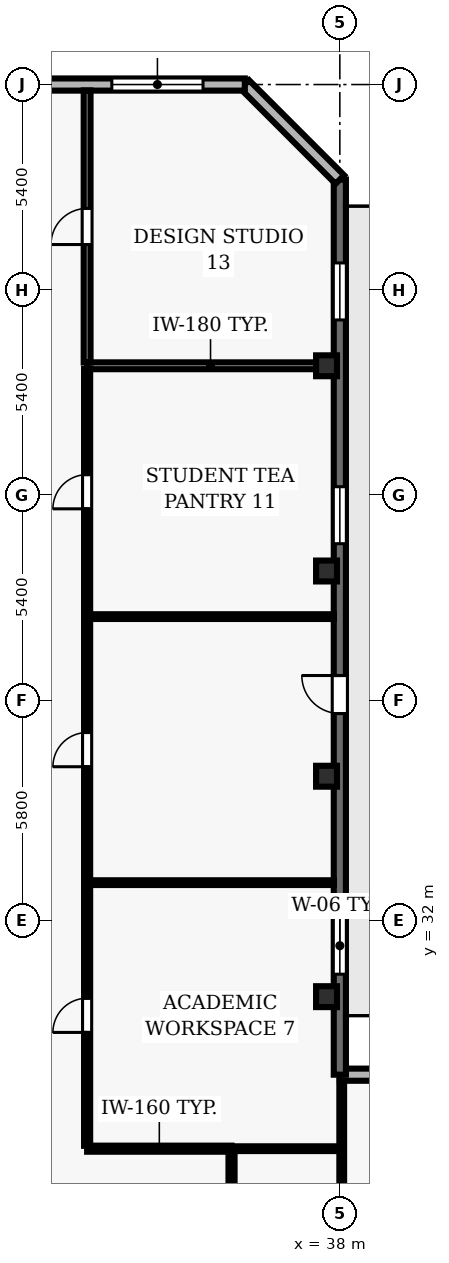
"""IFC4 building model, lengths in metres.
Left out: names, types, materials, properties, quantities, classifications, styles, units other than length and angle.
Written with IfcOpenShell. Run it as: python <this file> out.ifc"""

import sys

from ifc_helpers import new_model, si_unit, direction, frame, frame_2d, origin, origin_2d, place, context, subcontext, project, spatial, rectangle, hollow_rectangle, extrude, element, fill, save


model = new_model("IFC4")
c1 = context("Model", 3, precision=1e-05, world=origin(), true_north=direction((0.0, 1.0)))
c2 = subcontext(c1, "Body", "Model", "MODEL_VIEW")
j1 = project(units=[si_unit("LENGTHUNIT", "METRE"), si_unit("PLANEANGLEUNIT", "RADIAN")], contexts=[c1])
p1 = place(None, origin())
s1 = spatial("IfcSite", under=j1, at=p1, CompositionType="ELEMENT")
p2 = place(p1, origin())
s2 = spatial("IfcBuilding", under=s1, at=p2, CompositionType="ELEMENT")
p3 = place(p2, frame((0.0, 0.0, 42.7)))
s3 = spatial("IfcBuildingStorey", under=s2, at=p3, CompositionType="ELEMENT", Elevation=42.7)
for number, where, z_axis, x_axis in (
    (1, (37.65, 30.0, 0.0), (0.0, 0.0, 1.0), (1.0, 0.0, 0.0)),
    (2, (37.65, 35.8, 0.0), (0.0, 0.0, 1.0), (1.0, 0.0, 0.0)),
    (3, (37.65, 41.2, 0.0), (0.0, 0.0, 1.0), (1.0, 0.0, 0.0)),
    (4, (37.65, 46.6, 0.0), (0.0, 0.0, 1.0), (1.0, 0.0, 0.0)),
):
    element("IfcColumn", number, at=place(p3, frame(where, z_axis=z_axis, x_axis=x_axis)), inside=s3, PredefinedType="COLUMN", context=c2, shape_type="SweptSolid", body=[
        extrude(hollow_rectangle(XDim=0.55, YDim=0.55, WallThickness=0.025, at=origin_2d()), origin(), (0.0, 0.0, 1.0), 3.9),
    ])
p4 = place(p3, frame((52.85, 27.947, 0.0), z_axis=(0.0, 0.0, 1.0), x_axis=(-1.0, 0.0, 0.0)))
e5 = element("IfcWall", 5, at=p4, inside=s3, PredefinedType="SOLIDWALL", context=c2, shape_type="SweptSolid", body=[
    extrude(rectangle(XDim=14.85, YDim=0.32, at=frame_2d((7.425, 0.0))), origin(), (0.0, 0.0, 1.0), 3.69),
])
p5 = place(p4, frame((2.513, 0.0, 0.9)))
e6 = element("IfcOpeningElement", 6, at=p5, cuts=e5, PredefinedType="OPENING", context=c2, shape_type="SweptSolid", body=[
    extrude(rectangle(XDim=2.4, YDim=1.6, at=frame_2d((1.2, 0.8))), frame((0.0, 0.17, 0.0), z_axis=(0.0, -1.0, 0.0), x_axis=(1.0, 0.0, 0.0)), (0.0, 0.0, 1.0), 0.34),
])
p6 = place(p4, frame((9.938, 0.0, 0.9)))
e7 = element("IfcOpeningElement", 7, at=p6, cuts=e5, PredefinedType="OPENING", context=c2, shape_type="SweptSolid", body=[
    extrude(rectangle(XDim=2.4, YDim=1.6, at=frame_2d((1.2, 0.8))), frame((0.0, 0.17, 0.0), z_axis=(0.0, -1.0, 0.0), x_axis=(1.0, 0.0, 0.0)), (0.0, 0.0, 1.0), 0.34),
])
p7 = place(p3, frame((38.0, 27.947, 0.0), z_axis=(0.0, 0.0, 1.0), x_axis=(0.0, 1.0, 0.0)))
e8 = element("IfcWall", 8, at=p7, inside=s3, PredefinedType="SOLIDWALL", context=c2, shape_type="SweptSolid", body=[
    extrude(rectangle(XDim=23.553, YDim=0.32, at=frame_2d((11.776, 0.0))), origin(), (0.0, 0.0, 1.0), 3.69),
])
p8 = place(p7, frame((9.503, 0.0, 0.0)))
e9 = element("IfcOpeningElement", 9, at=p8, cuts=e8, PredefinedType="OPENING", context=c2, shape_type="SweptSolid", body=[
    extrude(rectangle(XDim=1.0, YDim=2.2, at=frame_2d((0.5, 1.1))), frame((0.0, 0.17, 0.0), z_axis=(0.0, -1.0, 0.0), x_axis=(1.0, 0.0, 0.0)), (0.0, 0.0, 1.0), 0.34),
])
p9 = place(p7, frame((2.644, 0.0, 0.9)))
e10 = element("IfcOpeningElement", 10, at=p9, cuts=e8, PredefinedType="OPENING", context=c2, shape_type="SweptSolid", body=[
    extrude(rectangle(XDim=1.5, YDim=1.8, at=frame_2d((0.75, 0.9))), frame((0.0, 0.17, 0.0), z_axis=(0.0, -1.0, 0.0), x_axis=(1.0, 0.0, 0.0)), (0.0, 0.0, 1.0), 0.34),
])
p10 = place(p7, frame((13.971, 0.0, 0.9)))
e11 = element("IfcOpeningElement", 11, at=p10, cuts=e8, PredefinedType="OPENING", context=c2, shape_type="SweptSolid", body=[
    extrude(rectangle(XDim=1.5, YDim=1.8, at=frame_2d((0.75, 0.9))), frame((0.0, 0.17, 0.0), z_axis=(0.0, -1.0, 0.0), x_axis=(1.0, 0.0, 0.0)), (0.0, 0.0, 1.0), 0.34),
])
p11 = place(p7, frame((19.859, 0.0, 0.9)))
e12 = element("IfcOpeningElement", 12, at=p11, cuts=e8, PredefinedType="OPENING", context=c2, shape_type="SweptSolid", body=[
    extrude(rectangle(XDim=1.5, YDim=1.8, at=frame_2d((0.75, 0.9))), frame((0.0, 0.17, 0.0), z_axis=(0.0, -1.0, 0.0), x_axis=(1.0, 0.0, 0.0)), (0.0, 0.0, 1.0), 0.34),
])
p12 = place(p3, frame((38.0, 51.5, 0.0), z_axis=(0.0, 0.0, 1.0), x_axis=(-0.707106781187, 0.707106781187, 0.0)))
e13 = element("IfcWall", 13, at=p12, inside=s3, PredefinedType="SOLIDWALL", context=c2, shape_type="SweptSolid", body=[
    extrude(rectangle(XDim=3.536, YDim=0.32, at=frame_2d((1.768, 0.0))), origin(), (0.0, 0.0, 1.0), 3.69),
])
p13 = place(p3, frame((35.5, 54.0, 0.0), z_axis=(0.0, 0.0, 1.0), x_axis=(-1.0, 0.0, 0.0)))
e14 = element("IfcWall", 14, at=p13, inside=s3, PredefinedType="SOLIDWALL", context=c2, shape_type="SweptSolid", body=[
    extrude(rectangle(XDim=11.0, YDim=0.32, at=frame_2d((5.5, 0.0))), origin(), (0.0, 0.0, 1.0), 3.69),
])
p14 = place(p13, frame((1.1, 0.0, 0.9)))
e15 = element("IfcOpeningElement", 15, at=p14, cuts=e14, PredefinedType="OPENING", context=c2, shape_type="SweptSolid", body=[
    extrude(rectangle(XDim=2.4, YDim=1.8, at=frame_2d((1.2, 0.9))), frame((0.0, 0.17, 0.0), z_axis=(0.0, -1.0, 0.0), x_axis=(1.0, 0.0, 0.0)), (0.0, 0.0, 1.0), 0.34),
])
p15 = place(p13, frame((7.05, 0.0, 0.9)))
e16 = element("IfcOpeningElement", 16, at=p15, cuts=e14, PredefinedType="OPENING", context=c2, shape_type="SweptSolid", body=[
    extrude(rectangle(XDim=2.4, YDim=1.8, at=frame_2d((1.2, 0.9))), frame((0.0, 0.17, 0.0), z_axis=(0.0, -1.0, 0.0), x_axis=(1.0, 0.0, 0.0)), (0.0, 0.0, 1.0), 0.34),
])
p16 = place(p3, frame((35.15, 26.0, 0.0), z_axis=(0.0, 0.0, 1.0), x_axis=(-1.0, 0.0, 0.0)))
e17 = element("IfcWall", 17, at=p16, inside=s3, PredefinedType="PARTITIONING", context=c2, shape_type="SweptSolid", body=[
    extrude(rectangle(XDim=3.8, YDim=0.16, at=frame_2d((1.9, 0.0))), origin(), (0.0, 0.0, 1.0), 3.69),
])
p17 = place(p3, frame((35.15, 26.0, 0.0), z_axis=(0.0, 0.0, 1.0), x_axis=(1.0, 0.0, 0.0)))
e18 = element("IfcWall", 18, at=p17, inside=s3, PredefinedType="PARTITIONING", context=c2, shape_type="SweptSolid", body=[
    extrude(rectangle(XDim=2.7, YDim=0.125, at=frame_2d((1.35, 0.0))), origin(), (0.0, 0.0, 1.0), 3.69),
])
p18 = place(p3, frame((37.845, 33.0, 0.0), z_axis=(0.0, 0.0, 1.0), x_axis=(-1.0, 0.0, 0.0)))
e19 = element("IfcWall", 19, at=p18, inside=s3, PredefinedType="PARTITIONING", context=c2, shape_type="SweptSolid", body=[
    extrude(rectangle(XDim=6.495, YDim=0.125, at=frame_2d((3.248, 0.0))), origin(), (0.0, 0.0, 1.0), 3.277),
])
p19 = place(p3, frame((37.845, 40.0, 0.0), z_axis=(0.0, 0.0, 1.0), x_axis=(-1.0, 0.0, 0.0)))
e20 = element("IfcWall", 20, at=p19, inside=s3, PredefinedType="PARTITIONING", context=c2, shape_type="SweptSolid", body=[
    extrude(rectangle(XDim=6.495, YDim=0.125, at=frame_2d((3.248, 0.0))), origin(), (0.0, 0.0, 1.0), 3.69),
])
p20 = place(p3, frame((37.845, 46.6, 0.0), z_axis=(0.0, 0.0, 1.0), x_axis=(-1.0, 0.0, 0.0)))
e21 = element("IfcWall", 21, at=p20, inside=s3, PredefinedType="PARTITIONING", context=c2, shape_type="SweptSolid", body=[
    extrude(rectangle(XDim=6.495, YDim=0.18, at=frame_2d((3.248, 0.0))), origin(), (0.0, 0.0, 1.0), 3.055),
])
p21 = place(p3, frame((31.35, 26.075, 0.0), z_axis=(0.0, 0.0, 1.0), x_axis=(0.0, 1.0, 0.0)))
e22 = element("IfcWall", 22, at=p21, inside=s3, PredefinedType="PARTITIONING", context=c2, shape_type="SweptSolid", body=[
    extrude(rectangle(XDim=6.868, YDim=0.16, at=frame_2d((3.434, 0.0))), origin(), (0.0, 0.0, 1.0), 3.69),
])
p22 = place(p21, frame((2.984, 0.0, 0.0)))
e23 = element("IfcOpeningElement", 23, at=p22, cuts=e22, PredefinedType="OPENING", context=c2, shape_type="SweptSolid", body=[
    extrude(rectangle(XDim=0.9, YDim=2.1, at=frame_2d((0.45, 1.05))), frame((0.0, 0.09, 0.0), z_axis=(0.0, -1.0, 0.0), x_axis=(1.0, 0.0, 0.0)), (0.0, 0.0, 1.0), 0.18),
])
p23 = place(p3, frame((31.35, 33.057, 0.0), z_axis=(0.0, 0.0, 1.0), x_axis=(0.0, 1.0, 0.0)))
e24 = element("IfcWall", 24, at=p23, inside=s3, PredefinedType="PARTITIONING", context=c2, shape_type="SweptSolid", body=[
    extrude(rectangle(XDim=6.886, YDim=0.16, at=frame_2d((3.443, 0.0))), origin(), (0.0, 0.0, 1.0), 3.69),
])
p24 = place(p23, frame((2.993, 0.0, 0.0)))
e25 = element("IfcOpeningElement", 25, at=p24, cuts=e24, PredefinedType="OPENING", context=c2, shape_type="SweptSolid", body=[
    extrude(rectangle(XDim=0.9, YDim=2.1, at=frame_2d((0.45, 1.05))), frame((0.0, 0.09, 0.0), z_axis=(0.0, -1.0, 0.0), x_axis=(1.0, 0.0, 0.0)), (0.0, 0.0, 1.0), 0.18),
])
p25 = place(p3, frame((31.35, 40.057, 0.0), z_axis=(0.0, 0.0, 1.0), x_axis=(0.0, 1.0, 0.0)))
e26 = element("IfcWall", 26, at=p25, inside=s3, PredefinedType="PARTITIONING", context=c2, shape_type="SweptSolid", body=[
    extrude(rectangle(XDim=6.458, YDim=0.16, at=frame_2d((3.229, 0.0))), origin(), (0.0, 0.0, 1.0), 3.69),
])
p26 = place(p25, frame((2.779, 0.0, 0.0)))
e27 = element("IfcOpeningElement", 27, at=p26, cuts=e26, PredefinedType="OPENING", context=c2, shape_type="SweptSolid", body=[
    extrude(rectangle(XDim=0.9, YDim=2.1, at=frame_2d((0.45, 1.05))), frame((0.0, 0.09, 0.0), z_axis=(0.0, -1.0, 0.0), x_axis=(1.0, 0.0, 0.0)), (0.0, 0.0, 1.0), 0.18),
])
p27 = place(p3, frame((31.35, 46.685, 0.0), z_axis=(0.0, 0.0, 1.0), x_axis=(0.0, 1.0, 0.0)))
e28 = element("IfcWall", 28, at=p27, inside=s3, PredefinedType="PARTITIONING", context=c2, shape_type="SweptSolid", body=[
    extrude(rectangle(XDim=7.16, YDim=0.18, at=frame_2d((3.58, 0.0))), origin(), (0.0, 0.0, 1.0), 3.69),
])
p28 = place(p27, frame((3.105, 0.0, 0.0)))
e29 = element("IfcOpeningElement", 29, at=p28, cuts=e28, PredefinedType="OPENING", context=c2, shape_type="SweptSolid", body=[
    extrude(rectangle(XDim=0.95, YDim=2.1, at=frame_2d((0.475, 1.05))), frame((0.0, 0.1, 0.0), z_axis=(0.0, -1.0, 0.0), x_axis=(1.0, 0.0, 0.0)), (0.0, 0.0, 1.0), 0.2),
])
p29 = place(p3, frame((35.15, 24.07, 0.0), z_axis=(0.0, 0.0, 1.0), x_axis=(0.0, 1.0, 0.0)))
e30 = element("IfcWall", 30, at=p29, inside=s3, PredefinedType="PARTITIONING", context=c2, shape_type="SweptSolid", body=[
    extrude(rectangle(XDim=1.855, YDim=0.16, at=frame_2d((0.927, 0.0))), origin(), (0.0, 0.0, 1.0), 3.69),
])
p30 = place(p3, frame((38.05, 27.792, 0.0), z_axis=(0.0, 0.0, 1.0), x_axis=(0.0, -1.0, 0.0)))
e31 = element("IfcWall", 31, at=p30, inside=s3, PredefinedType="PARTITIONING", context=c2, shape_type="SweptSolid", body=[
    extrude(rectangle(XDim=3.742, YDim=0.125, at=frame_2d((1.871, 0.0))), origin(), (0.0, 0.0, 1.0), 3.055),
])
p31 = place(p8, origin())
e32 = element("IfcDoor", 32, at=p31, inside=s3, OperationType="SINGLE_SWING_RIGHT", PredefinedType="DOOR", context=c2, shape_type="SweptSolid", body=[
    extrude(rectangle(XDim=1.0, YDim=2.2, at=frame_2d((0.5, 1.1))), frame((0.0, 0.025, 0.0), z_axis=(0.0, -1.0, 0.0), x_axis=(1.0, 0.0, 0.0)), (0.0, 0.0, 1.0), 0.05),
])
fill(e9, e32)
p32 = place(p9, origin())
e33 = element("IfcWindow", 33, at=p32, inside=s3, PartitioningType="SINGLE_PANEL", PredefinedType="WINDOW", context=c2, shape_type="SweptSolid", body=[
    extrude(rectangle(XDim=1.5, YDim=1.8, at=frame_2d((0.75, 0.9))), frame((0.0, 0.03, 0.0), z_axis=(0.0, -1.0, 0.0), x_axis=(1.0, 0.0, 0.0)), (0.0, 0.0, 1.0), 0.06),
])
fill(e10, e33)
p33 = place(p10, origin())
e34 = element("IfcWindow", 34, at=p33, inside=s3, PartitioningType="SINGLE_PANEL", PredefinedType="WINDOW", context=c2, shape_type="SweptSolid", body=[
    extrude(rectangle(XDim=1.5, YDim=1.8, at=frame_2d((0.75, 0.9))), frame((0.0, 0.03, 0.0), z_axis=(0.0, -1.0, 0.0), x_axis=(1.0, 0.0, 0.0)), (0.0, 0.0, 1.0), 0.06),
])
fill(e11, e34)
p34 = place(p11, origin())
e35 = element("IfcWindow", 35, at=p34, inside=s3, PartitioningType="SINGLE_PANEL", PredefinedType="WINDOW", context=c2, shape_type="SweptSolid", body=[
    extrude(rectangle(XDim=1.5, YDim=1.8, at=frame_2d((0.75, 0.9))), frame((0.0, 0.03, 0.0), z_axis=(0.0, -1.0, 0.0), x_axis=(1.0, 0.0, 0.0)), (0.0, 0.0, 1.0), 0.06),
])
fill(e12, e35)
p35 = place(p14, origin())
e36 = element("IfcWindow", 36, at=p35, inside=s3, PartitioningType="SINGLE_PANEL", PredefinedType="WINDOW", context=c2, shape_type="SweptSolid", body=[
    extrude(rectangle(XDim=2.4, YDim=1.8, at=frame_2d((1.2, 0.9))), frame((0.0, 0.03, 0.0), z_axis=(0.0, -1.0, 0.0), x_axis=(1.0, 0.0, 0.0)), (0.0, 0.0, 1.0), 0.06),
])
fill(e15, e36)
p36 = place(p22, origin())
e37 = element("IfcDoor", 37, at=p36, inside=s3, OperationType="SINGLE_SWING_LEFT", PredefinedType="DOOR", context=c2, shape_type="SweptSolid", body=[
    extrude(rectangle(XDim=0.9, YDim=2.1, at=frame_2d((0.45, 1.05))), frame((0.0, 0.025, 0.0), z_axis=(0.0, -1.0, 0.0), x_axis=(1.0, 0.0, 0.0)), (0.0, 0.0, 1.0), 0.05),
])
fill(e23, e37)
p37 = place(p24, origin())
e38 = element("IfcDoor", 38, at=p37, inside=s3, OperationType="SINGLE_SWING_LEFT", PredefinedType="DOOR", context=c2, shape_type="SweptSolid", body=[
    extrude(rectangle(XDim=0.9, YDim=2.1, at=frame_2d((0.45, 1.05))), frame((0.0, 0.025, 0.0), z_axis=(0.0, -1.0, 0.0), x_axis=(1.0, 0.0, 0.0)), (0.0, 0.0, 1.0), 0.05),
])
fill(e25, e38)
p38 = place(p26, origin())
e39 = element("IfcDoor", 39, at=p38, inside=s3, OperationType="SINGLE_SWING_LEFT", PredefinedType="DOOR", context=c2, shape_type="SweptSolid", body=[
    extrude(rectangle(XDim=0.9, YDim=2.1, at=frame_2d((0.45, 1.05))), frame((0.0, 0.025, 0.0), z_axis=(0.0, -1.0, 0.0), x_axis=(1.0, 0.0, 0.0)), (0.0, 0.0, 1.0), 0.05),
])
fill(e27, e39)
p39 = place(p28, origin())
e40 = element("IfcDoor", 40, at=p39, inside=s3, OperationType="SINGLE_SWING_LEFT", PredefinedType="DOOR", context=c2, shape_type="SweptSolid", body=[
    extrude(rectangle(XDim=0.95, YDim=2.1, at=frame_2d((0.475, 1.05))), frame((0.0, 0.025, 0.0), z_axis=(0.0, -1.0, 0.0), x_axis=(1.0, 0.0, 0.0)), (0.0, 0.0, 1.0), 0.05),
])
fill(e29, e40)
save(model, sys.argv[1])
